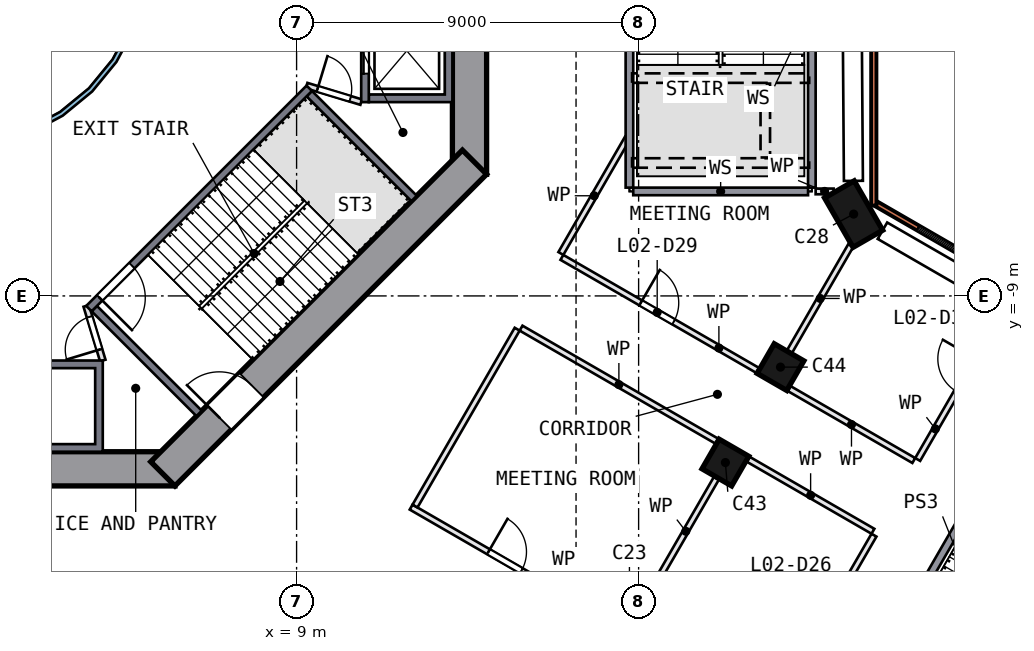
"""IFC4 building model, lengths in metres.
Left out: names, types, materials, properties, quantities, classifications, styles, units other than length and angle.
Written with IfcOpenShell. Run it as: python <this file> out.ifc"""

import sys

from ifc_helpers import new_model, si_unit, direction, frame, frame_2d, origin, origin_2d, place, context, subcontext, project, spatial, polyline, rectangle, outline, extrude, element, fill, save


model = new_model("IFC4")
c1 = context("Model", 3, precision=1e-05, world=origin(), true_north=direction((0.0, 1.0)))
c2 = subcontext(c1, "Body", "Model", "MODEL_VIEW")
j1 = project(units=[si_unit("LENGTHUNIT", "METRE"), si_unit("PLANEANGLEUNIT", "RADIAN")], contexts=[c1])
p1 = place(None, origin())
s1 = spatial("IfcSite", under=j1, at=p1, CompositionType="ELEMENT")
p2 = place(p1, origin())
s2 = spatial("IfcBuilding", under=s1, at=p2, CompositionType="ELEMENT")
p3 = place(p2, frame((0.0, 0.0, 14.0)))
s3 = spatial("IfcBuildingStorey", under=s2, at=p3, CompositionType="ELEMENT", Elevation=14.0)
p4 = place(p3, frame((23.658, -6.846, 0.0), z_axis=(0.0, 0.0, 1.0), x_axis=(0.5, -0.866025404, 0.0)))
e1 = element("IfcColumn", 1, at=p4, inside=s3, PredefinedType="COLUMN", context=c2, shape_type="SweptSolid", body=[
    extrude(rectangle(XDim=1.5, YDim=0.9, at=origin_2d()), origin(), (0.0, 0.0, 1.0), 4.55),
])
for number, where, z_axis, x_axis in (
    (2, (20.283, -13.385, 0.0), (0.0, 0.0, 1.0), (0.866, -0.5, 0.0)),
    (3, (21.733, -10.873, 0.0), (0.0, 0.0, 1.0), (0.866, -0.5, 0.0)),
):
    element("IfcColumn", number, at=place(p3, frame(where, z_axis=z_axis, x_axis=x_axis)), inside=s3, PredefinedType="COLUMN", context=c2, shape_type="SweptSolid", body=[
        extrude(rectangle(XDim=0.9, YDim=0.9, at=origin_2d()), origin(), (0.0, 0.0, 1.0), 4.55),
    ])
p5 = place(p3, frame((13.55, -5.799, 0.0), z_axis=(0.0, 0.0, 1.0), x_axis=(0.0, 1.0, 0.0)))
e4 = element("IfcWall", 4, at=p5, inside=s3, PredefinedType="SHEAR", context=c2, shape_type="SweptSolid", body=[
    extrude(rectangle(XDim=11.598, YDim=0.9, at=frame_2d((5.799, 0.0))), origin(), (0.0, 0.0, 1.0), 5.0),
])
p6 = place(p5, frame((4.899, 0.0, 0.0)))
e5 = element("IfcOpeningElement", 5, at=p6, cuts=e4, PredefinedType="OPENING", context=c2, shape_type="SweptSolid", body=[
    extrude(rectangle(XDim=1.8, YDim=2.1, at=frame_2d((0.9, 1.05))), frame((0.0, 0.46, 0.0), z_axis=(0.0, -1.0, 0.0), x_axis=(1.0, 0.0, 0.0)), (0.0, 0.0, 1.0), 0.92),
])
p7 = place(p3, frame((-5.799, -13.55, 0.0), z_axis=(0.0, 0.0, 1.0), x_axis=(1.0, 0.0, 0.0)))
e6 = element("IfcWall", 6, at=p7, inside=s3, PredefinedType="SHEAR", context=c2, shape_type="SweptSolid", body=[
    extrude(rectangle(XDim=11.598, YDim=0.9, at=frame_2d((5.799, 0.0))), origin(), (0.0, 0.0, 1.0), 5.0),
])
p8 = place(p7, frame((4.899, 0.0, 0.0)))
e7 = element("IfcOpeningElement", 7, at=p8, cuts=e6, PredefinedType="OPENING", context=c2, shape_type="SweptSolid", body=[
    extrude(rectangle(XDim=1.8, YDim=2.1, at=frame_2d((0.9, 1.05))), frame((0.0, 0.46, 0.0), z_axis=(0.0, -1.0, 0.0), x_axis=(1.0, 0.0, 0.0)), (0.0, 0.0, 1.0), 0.92),
])
p9 = place(p3, frame((5.481, -13.682, 0.0), z_axis=(0.0, 0.0, 1.0), x_axis=(0.707106781, 0.707106781, 0.0)))
e8 = element("IfcWall", 8, at=p9, inside=s3, PredefinedType="SHEAR", context=c2, shape_type="SweptSolid", body=[
    extrude(rectangle(XDim=11.598, YDim=0.9, at=frame_2d((5.799, 0.0))), origin(), (0.0, 0.0, 1.0), 5.0),
])
p10 = place(p9, frame((2.099, 0.0, 0.0)))
e9 = element("IfcOpeningElement", 9, at=p10, cuts=e8, PredefinedType="OPENING", context=c2, shape_type="SweptSolid", body=[
    extrude(rectangle(XDim=1.2, YDim=2.1, at=frame_2d((0.6, 1.05))), frame((0.0, 0.46, 0.0), z_axis=(0.0, -1.0, 0.0), x_axis=(1.0, 0.0, 0.0)), (0.0, 0.0, 1.0), 0.92),
])
p11 = place(p3, frame((33.751, -12.062, 0.0), z_axis=(0.0, 0.0, 1.0), x_axis=(-0.86602647, 0.499998154, 0.0)))
e10 = element("IfcWall", 10, at=p11, inside=s3, PredefinedType="SOLIDWALL", context=c2, shape_type="SweptSolid", body=[
    extrude(rectangle(XDim=10.961, YDim=0.14, at=frame_2d((5.481, 0.0))), origin(), (0.0, 0.0, 1.0), 4.55),
])
p12 = place(p11, frame((6.702, 0.0, 0.9)))
e11 = element("IfcOpeningElement", 11, at=p12, cuts=e10, PredefinedType="OPENING", context=c2, shape_type="SweptSolid", body=[
    extrude(rectangle(XDim=3.0, YDim=2.7, at=frame_2d((1.5, 1.35))), frame((0.0, 0.08, 0.0), z_axis=(0.0, -1.0, 0.0), x_axis=(1.0, 0.0, 0.0)), (0.0, 0.0, 1.0), 0.16),
])
p13 = place(p3, frame((24.188, -6.621, 0.0), z_axis=(0.0, 0.0, 1.0), x_axis=(0.0, 1.0, 0.0)))
e12 = element("IfcWall", 12, at=p13, inside=s3, PredefinedType="SOLIDWALL", context=c2, shape_type="SweptSolid", body=[
    extrude(rectangle(XDim=13.242, YDim=0.14, at=frame_2d((6.621, 0.0))), origin(), (0.0, 0.0, 1.0), 4.55),
])
p14 = place(p3, origin())
e13 = element("IfcWall", 13, at=p14, inside=s3, PredefinedType="SOLIDWALL", context=c2, shape_type="SweptSolid", body=[
    extrude(outline(polyline([(13.1, -3.9), (10.9, -3.9), (10.9, -3.7), (12.9, -3.7), (12.9, -1.4), (10.9, -1.4), (10.9, -1.2), (13.1, -1.2), (13.1, -3.9)])), origin(), (0.0, 0.0, 1.0), 4.55),
])
p15 = place(p3, frame((10.8, -1.2, 0.0), z_axis=(0.0, 0.0, 1.0), x_axis=(0.0, -1.0, 0.0)))
e14 = element("IfcWall", 14, at=p15, inside=s3, PredefinedType="SOLIDWALL", context=c2, shape_type="SweptSolid", body=[
    extrude(rectangle(XDim=2.7, YDim=0.2, at=frame_2d((1.35, 0.0))), origin(), (0.0, 0.0, 1.0), 4.55),
])
p16 = place(p15, frame((0.75, 0.0, 0.0)))
e15 = element("IfcOpeningElement", 15, at=p16, cuts=e14, PredefinedType="OPENING", context=c2, shape_type="SweptSolid", body=[
    extrude(rectangle(XDim=1.2, YDim=2.1, at=frame_2d((0.6, 1.05))), frame((0.0, 0.11, 0.0), z_axis=(0.0, -1.0, 0.0), x_axis=(1.0, 0.0, 0.0)), (0.0, 0.0, 1.0), 0.22),
])
p17 = place(p3, origin())
e16 = element("IfcWall", 16, at=p17, inside=s3, PredefinedType="SOLIDWALL", context=c2, shape_type="SweptSolid", body=[
    extrude(outline(polyline([(3.9, -10.7), (3.9, -13.1), (1.2, -13.1), (1.2, -10.7), (3.9, -10.7)]), holes=[polyline([(1.4, -12.9), (3.7, -12.9), (3.7, -10.9), (1.4, -10.9), (1.4, -12.9)])]), origin(), (0.0, 0.0, 1.0), 4.55),
])
p18 = place(p3, frame((9.334, -3.535, 0.0), z_axis=(0.0, 0.0, 1.0), x_axis=(-0.707106781, -0.707106781, 0.0)))
e17 = element("IfcWall", 17, at=p18, inside=s3, PredefinedType="SOLIDWALL", context=c2, shape_type="SweptSolid", body=[
    extrude(rectangle(XDim=8.2, YDim=0.2, at=frame_2d((4.1, 0.0))), origin(), (0.0, 0.0, 1.0), 4.55),
])
p19 = place(p18, frame((6.6, 0.0, 0.0)))
e18 = element("IfcOpeningElement", 18, at=p19, cuts=e17, PredefinedType="OPENING", context=c2, shape_type="SweptSolid", body=[
    extrude(rectangle(XDim=1.2, YDim=2.1, at=frame_2d((0.6, 1.05))), frame((0.0, 0.11, 0.0), z_axis=(0.0, -1.0, 0.0), x_axis=(1.0, 0.0, 0.0)), (0.0, 0.0, 1.0), 0.22),
])
for number, where, z_axis, x_axis in (
    (19, (3.677, -9.334, 0.0), (0.0, 0.0, 1.0), (0.707, -0.707, 0.0)),
    (20, (9.334, -3.677, 0.0), (0.0, 0.0, 1.0), (0.707, -0.707, 0.0)),
):
    element("IfcWall", number, at=place(p3, frame(where, z_axis=z_axis, x_axis=x_axis)), inside=s3, PredefinedType="SOLIDWALL", context=c2, shape_type="SweptSolid", body=[
        extrude(rectangle(XDim=3.9, YDim=0.2, at=frame_2d((1.95, 0.0))), origin(), (0.0, 0.0, 1.0), 4.55),
    ])
p20 = place(p3, frame((3.9, -10.7, 0.0), z_axis=(0.0, 0.0, 1.0), x_axis=(-0.289808785, 0.957084567, 0.0)))
e21 = element("IfcWall", 21, at=p20, inside=s3, PredefinedType="PARTITIONING", context=c2, shape_type="SweptSolid", body=[
    extrude(rectangle(XDim=1.501, YDim=0.15, at=frame_2d((0.75, 0.0))), origin(), (0.0, 0.0, 1.0), 4.55),
])
p21 = place(p20, frame((0.301, 0.0, 0.0)))
e22 = element("IfcOpeningElement", 22, at=p21, cuts=e21, PredefinedType="OPENING", context=c2, shape_type="SweptSolid", body=[
    extrude(rectangle(XDim=0.9, YDim=2.1, at=frame_2d((0.45, 1.05))), frame((0.0, 0.085, 0.0), z_axis=(0.0, -1.0, 0.0), x_axis=(1.0, 0.0, 0.0)), (0.0, 0.0, 1.0), 0.17),
])
p22 = place(p3, frame((9.263, -3.465, 0.0), z_axis=(0.0, 0.0, 1.0), x_axis=(0.957084567, -0.289808785, 0.0)))
e23 = element("IfcWall", 23, at=p22, inside=s3, PredefinedType="PARTITIONING", context=c2, shape_type="SweptSolid", body=[
    extrude(rectangle(XDim=1.501, YDim=0.15, at=frame_2d((0.75, 0.0))), origin(), (0.0, 0.0, 1.0), 4.55),
])
p23 = place(p22, frame((0.301, 0.0, 0.0)))
e24 = element("IfcOpeningElement", 24, at=p23, cuts=e23, PredefinedType="OPENING", context=c2, shape_type="SweptSolid", body=[
    extrude(rectangle(XDim=0.9, YDim=2.1, at=frame_2d((0.45, 1.05))), frame((0.0, 0.085, 0.0), z_axis=(0.0, -1.0, 0.0), x_axis=(1.0, 0.0, 0.0)), (0.0, 0.0, 1.0), 0.17),
])
p24 = place(p3, origin())
e25 = element("IfcWall", 25, at=p24, inside=s3, PredefinedType="SOLIDWALL", context=c2, shape_type="SweptSolid", body=[
    extrude(outline(polyline([(5.021, -0.999), (4.73, -1.959), (4.257, -2.844), (3.62, -3.62), (2.844, -4.257), (1.959, -4.73), (0.999, -5.021), (0.0, -5.12), (-0.999, -5.021), (-1.959, -4.73), (-2.844, -4.257), (-3.62, -3.62), (-4.257, -2.844), (-4.73, -1.959), (-5.021, -0.999), (-5.12, 0.0), (-5.021, 0.999), (-4.73, 1.959), (-4.257, 2.844), (-3.62, 3.62), (-2.844, 4.257), (-1.959, 4.73), (-0.999, 5.021), (0.0, 5.12), (0.999, 5.021), (1.959, 4.73), (2.844, 4.257), (3.62, 3.62), (4.257, 2.844), (4.73, 1.959), (5.021, 0.999), (5.12, 0.0), (5.021, -0.999)]), holes=[polyline([(4.904, 0.976), (4.619, 1.913), (4.157, 2.778), (3.535, 3.535), (2.778, 4.157), (1.913, 4.619), (0.976, 4.904), (0.0, 5.0), (-0.976, 4.904), (-1.913, 4.619), (-2.778, 4.157), (-3.535, 3.535), (-4.157, 2.778), (-4.619, 1.913), (-4.904, 0.976), (-5.0, 0.0), (-4.904, -0.976), (-4.619, -1.913), (-4.157, -2.778), (-3.535, -3.535), (-2.778, -4.157), (-1.913, -4.619), (-0.976, -4.904), (0.0, -5.0), (0.976, -4.904), (1.913, -4.619), (2.778, -4.157), (3.535, -3.535), (4.157, -2.778), (4.619, -1.913), (4.904, -0.976), (5.0, 0.0), (4.904, 0.976)])]), origin(), (0.0, 0.0, 1.0), 4.55),
])
p25 = place(p3, frame((12.014, -14.557, 0.0), z_axis=(0.0, 0.0, 1.0), x_axis=(0.866011812, -0.500023541, 0.0)))
e26 = element("IfcWall", 26, at=p25, inside=s3, PredefinedType="PARTITIONING", context=c2, shape_type="SweptSolid", body=[
    extrude(rectangle(XDim=5.732, YDim=0.15, at=frame_2d((2.866, 0.0))), origin(), (0.0, 0.0, 1.0), 4.55),
])
p26 = place(p25, frame((2.35, 0.0, 0.0)))
e27 = element("IfcOpeningElement", 27, at=p26, cuts=e26, PredefinedType="OPENING", context=c2, shape_type="SweptSolid", body=[
    extrude(rectangle(XDim=1.0, YDim=2.1, at=frame_2d((0.5, 1.05))), frame((0.0, 0.085, 0.0), z_axis=(0.0, -1.0, 0.0), x_axis=(1.0, 0.0, 0.0)), (0.0, 0.0, 1.0), 0.17),
])
p27 = place(p3, frame((14.804, -9.875, 0.0), z_axis=(0.0, 0.0, 1.0), x_axis=(-0.4999885, -0.866032043, 0.0)))
e28 = element("IfcWall", 28, at=p27, inside=s3, PredefinedType="PARTITIONING", context=c2, shape_type="SweptSolid", body=[
    extrude(rectangle(XDim=5.375, YDim=0.15, at=frame_2d((2.688, 0.0))), origin(), (0.0, 0.0, 1.0), 4.55),
])
p28 = place(p3, frame((14.906, -9.848, 0.0), z_axis=(0.0, 0.0, 1.0), x_axis=(0.866038559, -0.499977214, 0.0)))
e29 = element("IfcWall", 29, at=p28, inside=s3, PredefinedType="PARTITIONING", context=c2, shape_type="SweptSolid", body=[
    extrude(rectangle(XDim=5.945, YDim=0.15, at=frame_2d((2.973, 0.0))), origin(), (0.0, 0.0, 1.0), 4.55),
])
p29 = place(p3, frame((20.886, -13.3, 0.0), z_axis=(0.0, 0.0, 1.0), x_axis=(0.866012734, -0.500021944, 0.0)))
e30 = element("IfcWall", 30, at=p29, inside=s3, PredefinedType="PARTITIONING", context=c2, shape_type="SweptSolid", body=[
    extrude(rectangle(XDim=3.787, YDim=0.15, at=frame_2d((1.894, 0.0))), origin(), (0.0, 0.0, 1.0), 4.55),
])
p30 = place(p3, frame((18.438, -16.585, 0.0), z_axis=(0.0, 0.0, 1.0), x_axis=(0.500027049, 0.866009787, 0.0)))
e31 = element("IfcWall", 31, at=p30, inside=s3, PredefinedType="PARTITIONING", context=c2, shape_type="SweptSolid", body=[
    extrude(rectangle(XDim=3.215, YDim=0.15, at=frame_2d((1.607, 0.0))), origin(), (0.0, 0.0, 1.0), 4.55),
])
p31 = place(p3, frame((17.858, -6.25, 0.0), z_axis=(0.0, 0.0, 1.0), x_axis=(1.0, 0.0, 0.0)))
e32 = element("IfcWall", 32, at=p31, inside=s3, PredefinedType="SOLIDWALL", context=c2, shape_type="SweptSolid", body=[
    extrude(rectangle(XDim=4.6, YDim=0.2, at=frame_2d((2.3, 0.0))), origin(), (0.0, 0.0, 1.0), 4.55),
])
p32 = place(p3, frame((17.708, -4.845, 0.0), z_axis=(0.0, 0.0, 1.0), x_axis=(-0.499993523, -0.866029143, 0.0)))
e33 = element("IfcWall", 33, at=p32, inside=s3, PredefinedType="PARTITIONING", context=c2, shape_type="SweptSolid", body=[
    extrude(rectangle(XDim=3.508, YDim=0.15, at=frame_2d((1.754, 0.0))), origin(), (0.0, 0.0, 1.0), 4.55),
])
p33 = place(p3, frame((17.758, 3.15, 0.0), z_axis=(0.0, 0.0, 1.0), x_axis=(0.0, -1.0, 0.0)))
e34 = element("IfcWall", 34, at=p33, inside=s3, PredefinedType="SOLIDWALL", context=c2, shape_type="SweptSolid", body=[
    extrude(rectangle(XDim=9.3, YDim=0.2, at=frame_2d((4.65, 0.0))), origin(), (0.0, 0.0, 1.0), 4.55),
])
p34 = place(p3, frame((21.975, -10.458, 0.0), z_axis=(0.0, 0.0, 1.0), x_axis=(0.500027049, 0.866009787, 0.0)))
e35 = element("IfcWall", 35, at=p34, inside=s3, PredefinedType="PARTITIONING", context=c2, shape_type="SweptSolid", body=[
    extrude(rectangle(XDim=3.215, YDim=0.15, at=frame_2d((1.607, 0.0))), origin(), (0.0, 0.0, 1.0), 4.55),
])
p35 = place(p3, frame((22.558, -6.15, 0.0), z_axis=(0.0, 0.0, 1.0), x_axis=(0.0, 1.0, 0.0)))
e36 = element("IfcWall", 36, at=p35, inside=s3, PredefinedType="SOLIDWALL", context=c2, shape_type="SweptSolid", body=[
    extrude(rectangle(XDim=9.5, YDim=0.2, at=frame_2d((4.75, 0.0))), origin(), (0.0, 0.0, 1.0), 4.55),
])
p36 = place(p3, frame((22.658, -6.25, 0.0), z_axis=(0.0, 0.0, 1.0), x_axis=(1.0, 0.0, 0.0)))
e37 = element("IfcWall", 37, at=p36, inside=s3, PredefinedType="PARTITIONING", context=c2, shape_type="SweptSolid", body=[
    extrude(rectangle(XDim=0.473, YDim=0.15, at=frame_2d((0.237, 0.0))), origin(), (0.0, 0.0, 1.0), 4.55),
])
p37 = place(p3, frame((21.506, -19.951, 0.0), z_axis=(0.0, 0.0, 1.0), x_axis=(0.500008168, 0.866020688, 0.0)))
e38 = element("IfcWall", 38, at=p37, inside=s3, PredefinedType="PARTITIONING", context=c2, shape_type="SweptSolid", body=[
    extrude(rectangle(XDim=5.375, YDim=0.15, at=frame_2d((2.688, 0.0))), origin(), (0.0, 0.0, 1.0), 4.55),
])
p38 = place(p37, frame((2.225, 0.0, 0.0)))
e39 = element("IfcOpeningElement", 39, at=p38, cuts=e38, PredefinedType="OPENING", context=c2, shape_type="SweptSolid", body=[
    extrude(rectangle(XDim=1.0, YDim=2.1, at=frame_2d((0.5, 1.05))), frame((0.0, 0.085, 0.0), z_axis=(0.0, -1.0, 0.0), x_axis=(1.0, 0.0, 0.0)), (0.0, 0.0, 1.0), 0.17),
])
p39 = place(p3, frame((15.982, -7.986, 0.0), z_axis=(0.0, 0.0, 1.0), x_axis=(0.86601051, -0.500025795, 0.0)))
e40 = element("IfcWall", 40, at=p39, inside=s3, PredefinedType="PARTITIONING", context=c2, shape_type="SweptSolid", body=[
    extrude(rectangle(XDim=5.945, YDim=0.15, at=frame_2d((2.973, 0.0))), origin(), (0.0, 0.0, 1.0), 4.55),
])
p40 = place(p39, frame((2.395, 0.0, 0.0)))
e41 = element("IfcOpeningElement", 41, at=p40, cuts=e40, PredefinedType="OPENING", context=c2, shape_type="SweptSolid", body=[
    extrude(rectangle(XDim=1.0, YDim=2.1, at=frame_2d((0.5, 1.05))), frame((0.0, 0.085, 0.0), z_axis=(0.0, -1.0, 0.0), x_axis=(1.0, 0.0, 0.0)), (0.0, 0.0, 1.0), 0.17),
])
p41 = place(p3, frame((25.241, -13.332, 0.0), z_axis=(0.0, 0.0, 1.0), x_axis=(-0.866040651, 0.499973591, 0.0)))
e42 = element("IfcWall", 42, at=p41, inside=s3, PredefinedType="PARTITIONING", context=c2, shape_type="SweptSolid", body=[
    extrude(rectangle(XDim=3.787, YDim=0.15, at=frame_2d((1.894, 0.0))), origin(), (0.0, 0.0, 1.0), 4.55),
])
p42 = place(p3, frame((27.777, -12.688, 0.0), z_axis=(0.0, 0.0, 1.0), x_axis=(-0.500004225, -0.866022964, 0.0)))
e43 = element("IfcWall", 43, at=p42, inside=s3, PredefinedType="SOLIDWALL", context=c2, shape_type="SweptSolid", body=[
    extrude(rectangle(XDim=9.3, YDim=0.2, at=frame_2d((4.65, 0.0))), origin(), (0.0, 0.0, 1.0), 4.55),
])
p43 = place(p3, frame((25.343, -13.304, 0.0), z_axis=(0.0, 0.0, 1.0), x_axis=(0.499979347, 0.866037328, 0.0)))
e44 = element("IfcWall", 44, at=p43, inside=s3, PredefinedType="PARTITIONING", context=c2, shape_type="SweptSolid", body=[
    extrude(rectangle(XDim=5.21, YDim=0.15, at=frame_2d((2.605, 0.0))), origin(), (0.0, 0.0, 1.0), 4.55),
])
p44 = place(p43, frame((2.06, 0.0, 0.0)))
e45 = element("IfcOpeningElement", 45, at=p44, cuts=e44, PredefinedType="OPENING", context=c2, shape_type="SweptSolid", body=[
    extrude(rectangle(XDim=1.0, YDim=2.1, at=frame_2d((0.5, 1.05))), frame((0.0, 0.085, 0.0), z_axis=(0.0, -1.0, 0.0), x_axis=(1.0, 0.0, 0.0)), (0.0, 0.0, 1.0), 0.17),
])
p45 = place(p12, origin())
e46 = element("IfcWindow", 46, at=p45, inside=s3, PartitioningType="SINGLE_PANEL", PredefinedType="WINDOW", context=c2, shape_type="SweptSolid", body=[
    extrude(rectangle(XDim=3.0, YDim=2.7, at=frame_2d((1.5, 1.35))), frame((0.0, 0.03, 0.0), z_axis=(0.0, -1.0, 0.0), x_axis=(1.0, 0.0, 0.0)), (0.0, 0.0, 1.0), 0.06),
])
fill(e11, e46)
p46 = place(p16, origin())
e47 = element("IfcDoor", 47, at=p46, inside=s3, OperationType="DOUBLE_DOOR_SLIDING", PredefinedType="DOOR", context=c2, shape_type="SweptSolid", body=[
    extrude(rectangle(XDim=1.2, YDim=2.1, at=frame_2d((0.6, 1.05))), frame((0.0, 0.025, 0.0), z_axis=(0.0, -1.0, 0.0), x_axis=(1.0, 0.0, 0.0)), (0.0, 0.0, 1.0), 0.05),
])
fill(e15, e47)
p47 = place(p19, origin())
e48 = element("IfcDoor", 48, at=p47, inside=s3, OperationType="SINGLE_SWING_RIGHT", PredefinedType="DOOR", context=c2, shape_type="SweptSolid", body=[
    extrude(rectangle(XDim=1.2, YDim=2.1, at=frame_2d((0.6, 1.05))), frame((0.0, 0.025, 0.0), z_axis=(0.0, -1.0, 0.0), x_axis=(1.0, 0.0, 0.0)), (0.0, 0.0, 1.0), 0.05),
])
fill(e18, e48)
p48 = place(p10, origin())
e49 = element("IfcDoor", 49, at=p48, inside=s3, OperationType="SINGLE_SWING_LEFT", PredefinedType="DOOR", context=c2, shape_type="SweptSolid", body=[
    extrude(rectangle(XDim=1.2, YDim=2.1, at=frame_2d((0.6, 1.05))), frame((0.0, 0.025, 0.0), z_axis=(0.0, -1.0, 0.0), x_axis=(1.0, 0.0, 0.0)), (0.0, 0.0, 1.0), 0.05),
])
fill(e9, e49)
p49 = place(p21, origin())
e50 = element("IfcDoor", 50, at=p49, inside=s3, OperationType="SINGLE_SWING_LEFT", PredefinedType="DOOR", context=c2, shape_type="SweptSolid", body=[
    extrude(rectangle(XDim=0.9, YDim=2.1, at=frame_2d((0.45, 1.05))), frame((0.0, 0.025, 0.0), z_axis=(0.0, -1.0, 0.0), x_axis=(1.0, 0.0, 0.0)), (0.0, 0.0, 1.0), 0.05),
])
fill(e22, e50)
p50 = place(p23, origin())
e51 = element("IfcDoor", 51, at=p50, inside=s3, OperationType="SINGLE_SWING_LEFT", PredefinedType="DOOR", context=c2, shape_type="SweptSolid", body=[
    extrude(rectangle(XDim=0.9, YDim=2.1, at=frame_2d((0.45, 1.05))), frame((0.0, 0.025, 0.0), z_axis=(0.0, -1.0, 0.0), x_axis=(1.0, 0.0, 0.0)), (0.0, 0.0, 1.0), 0.05),
])
fill(e24, e51)
p51 = place(p26, origin())
e52 = element("IfcDoor", 52, at=p51, inside=s3, OperationType="SINGLE_SWING_LEFT", PredefinedType="DOOR", context=c2, shape_type="SweptSolid", body=[
    extrude(rectangle(XDim=1.0, YDim=2.1, at=frame_2d((0.5, 1.05))), frame((0.0, 0.025, 0.0), z_axis=(0.0, -1.0, 0.0), x_axis=(1.0, 0.0, 0.0)), (0.0, 0.0, 1.0), 0.05),
])
fill(e27, e52)
p52 = place(p40, origin())
e53 = element("IfcDoor", 53, at=p52, inside=s3, OperationType="SINGLE_SWING_LEFT", PredefinedType="DOOR", context=c2, shape_type="SweptSolid", body=[
    extrude(rectangle(XDim=1.0, YDim=2.1, at=frame_2d((0.5, 1.05))), frame((0.0, 0.025, 0.0), z_axis=(0.0, -1.0, 0.0), x_axis=(1.0, 0.0, 0.0)), (0.0, 0.0, 1.0), 0.05),
])
fill(e41, e53)
save(model, sys.argv[1])
